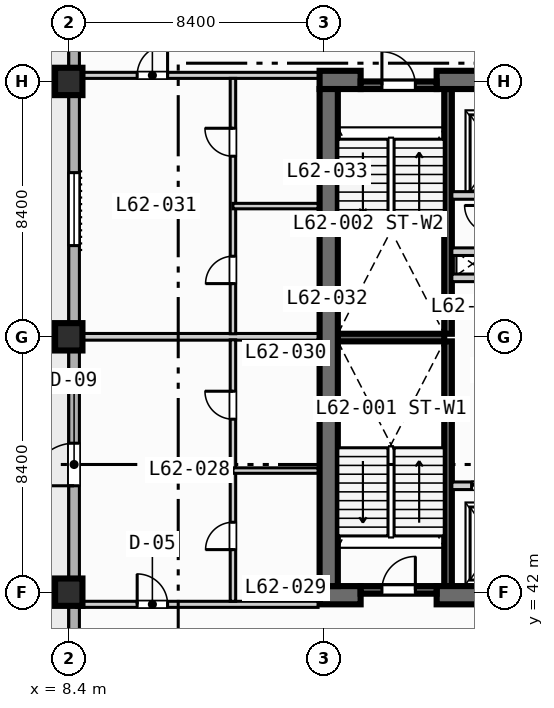
"""IFC4 building model, lengths in metres.
Left out: names, types, materials, properties, quantities, classifications, styles, units other than length and angle.
Written with IfcOpenShell. Run it as: python <this file> out.ifc"""

import sys

from ifc_helpers import new_model, si_unit, direction, frame, frame_2d, origin, origin_2d, place, context, subcontext, project, spatial, rectangle, extrude, element, fill, save


model = new_model("IFC4")
c1 = context("Model", 3, precision=1e-05, world=origin(), true_north=direction((0.0, 1.0)))
c2 = subcontext(c1, "Body", "Model", "MODEL_VIEW")
j1 = project(units=[si_unit("LENGTHUNIT", "METRE"), si_unit("PLANEANGLEUNIT", "RADIAN")], contexts=[c1])
p1 = place(None, origin())
s1 = spatial("IfcSite", under=j1, at=p1, CompositionType="ELEMENT")
p2 = place(p1, origin())
s2 = spatial("IfcBuilding", under=s1, at=p2, CompositionType="ELEMENT")
p3 = place(p2, frame((0.0, 0.0, 252.7)))
s3 = spatial("IfcBuildingStorey", under=s2, at=p3, CompositionType="ELEMENT", Elevation=252.7)
for number, where, z_axis, x_axis in (
    (1, (20.875, 42.2, 0.0), (0.0, 0.0, 1.0), (0.0, 1.0, 0.0)),
    (2, (20.875, 50.5, 0.0), (0.0, 0.0, 1.0), (0.0, 1.0, 0.0)),
):
    element("IfcWall", number, at=place(p3, frame(where, z_axis=z_axis, x_axis=x_axis)), inside=s3, PredefinedType="SOLIDWALL", context=c2, shape_type="SweptSolid", body=[
        extrude(rectangle(XDim=8.05, YDim=0.25, at=frame_2d((4.025, 0.0))), origin(), (0.0, 0.0, 1.0), 3.47),
    ])
p4 = place(p3, frame((17.25, 50.375, 0.0), z_axis=(0.0, 0.0, 1.0), x_axis=(1.0, 0.0, 0.0)))
e3 = element("IfcWall", 3, at=p4, inside=s3, PredefinedType="SOLIDWALL", context=c2, shape_type="SweptSolid", body=[
    extrude(rectangle(XDim=3.5, YDim=0.25, at=frame_2d((1.75, 0.0))), origin(), (0.0, 0.0, 1.0), 3.47),
])
p5 = place(p3, frame((16.65, 41.9, 0.0), z_axis=(0.0, 0.0, 1.0), x_axis=(1.0, 0.0, 0.0)))
e4 = element("IfcWall", 4, at=p5, inside=s3, PredefinedType="SHEAR", context=c2, shape_type="SweptSolid", body=[
    extrude(rectangle(XDim=1.35, YDim=0.6, at=frame_2d((0.675, 0.0))), origin(), (0.0, 0.0, 1.0), 3.47),
])
p6 = place(p3, frame((20.5, 41.9, 0.0), z_axis=(0.0, 0.0, 1.0), x_axis=(1.0, 0.0, 0.0)))
e5 = element("IfcWall", 5, at=p6, inside=s3, PredefinedType="SHEAR", context=c2, shape_type="SweptSolid", body=[
    extrude(rectangle(XDim=5.0, YDim=0.6, at=frame_2d((2.5, 0.0))), origin(), (0.0, 0.0, 1.0), 3.47),
])
p7 = place(p3, frame((16.65, 58.85, 0.0), z_axis=(0.0, 0.0, 1.0), x_axis=(1.0, 0.0, 0.0)))
e6 = element("IfcWall", 6, at=p7, inside=s3, PredefinedType="SHEAR", context=c2, shape_type="SweptSolid", body=[
    extrude(rectangle(XDim=1.35, YDim=0.6, at=frame_2d((0.675, 0.0))), origin(), (0.0, 0.0, 1.0), 3.47),
])
p8 = place(p3, frame((20.5, 58.85, 0.0), z_axis=(0.0, 0.0, 1.0), x_axis=(1.0, 0.0, 0.0)))
e7 = element("IfcWall", 7, at=p8, inside=s3, PredefinedType="SHEAR", context=c2, shape_type="SweptSolid", body=[
    extrude(rectangle(XDim=5.0, YDim=0.6, at=frame_2d((2.5, 0.0))), origin(), (0.0, 0.0, 1.0), 3.47),
])
p9 = place(p3, frame((16.95, 42.2, 0.0), z_axis=(0.0, 0.0, 1.0), x_axis=(0.0, 1.0, 0.0)))
e8 = element("IfcWall", 8, at=p9, inside=s3, PredefinedType="SHEAR", context=c2, shape_type="SweptSolid", body=[
    extrude(rectangle(XDim=16.35, YDim=0.6, at=frame_2d((8.175, 0.0))), origin(), (0.0, 0.0, 1.0), 3.47),
])
for number, where, z_axis, x_axis in (
    (9, (8.4, 42.0, 0.0), (0.0, 0.0, 1.0), (1.0, 0.0, 0.0)),
    (10, (8.4, 50.4, 0.0), (0.0, 0.0, 1.0), (1.0, 0.0, 0.0)),
    (11, (8.4, 58.8, 0.0), (0.0, 0.0, 1.0), (1.0, 0.0, 0.0)),
):
    element("IfcColumn", number, at=place(p3, frame(where, z_axis=z_axis, x_axis=x_axis)), inside=s3, PredefinedType="COLUMN", context=c2, shape_type="SweptSolid", body=[
        extrude(rectangle(XDim=0.9, YDim=0.9, at=origin_2d()), origin(), (0.0, 0.0, 1.0), 3.7),
    ])
p10 = place(p3, frame((8.575, 11.575, 0.0), z_axis=(0.0, 0.0, 1.0), x_axis=(0.0, 1.0, 0.0)))
e12 = element("IfcWall", 12, at=p10, inside=s3, PredefinedType="STANDARD", context=c2, shape_type="SweptSolid", body=[
    extrude(rectangle(XDim=60.85, YDim=0.35, at=frame_2d((30.425, 0.0))), origin(), (0.0, 0.0, 1.0), 3.47),
])
p11 = place(p10, frame((33.925, 0.0, 0.0)))
e13 = element("IfcOpeningElement", 13, at=p11, cuts=e12, PredefinedType="OPENING", context=c2, shape_type="SweptSolid", body=[
    extrude(rectangle(XDim=1.4, YDim=2.2, at=frame_2d((0.7, 1.1))), frame((0.0, 0.185, 0.0), z_axis=(0.0, -1.0, 0.0), x_axis=(1.0, 0.0, 0.0)), (0.0, 0.0, 1.0), 0.37),
])
p12 = place(p10, frame((25.025, 0.0, 0.85)))
e14 = element("IfcOpeningElement", 14, at=p12, cuts=e12, PredefinedType="OPENING", context=c2, shape_type="SweptSolid", body=[
    extrude(rectangle(XDim=2.4, YDim=1.95, at=frame_2d((1.2, 0.975))), frame((0.0, 0.185, 0.0), z_axis=(0.0, -1.0, 0.0), x_axis=(1.0, 0.0, 0.0)), (0.0, 0.0, 1.0), 0.37),
])
p13 = place(p10, frame((41.825, 0.0, 0.85)))
e15 = element("IfcOpeningElement", 15, at=p13, cuts=e12, PredefinedType="OPENING", context=c2, shape_type="SweptSolid", body=[
    extrude(rectangle(XDim=2.4, YDim=1.95, at=frame_2d((1.2, 0.975))), frame((0.0, 0.185, 0.0), z_axis=(0.0, -1.0, 0.0), x_axis=(1.0, 0.0, 0.0)), (0.0, 0.0, 1.0), 0.37),
])
p14 = place(p10, frame((19.25, 0.0, 0.85)))
e16 = element("IfcOpeningElement", 16, at=p14, cuts=e12, PredefinedType="OPENING", context=c2, shape_type="SweptSolid", body=[
    extrude(rectangle(XDim=1.8, YDim=1.8, at=frame_2d((0.9, 0.9))), frame((0.0, 0.185, 0.0), z_axis=(0.0, -1.0, 0.0), x_axis=(1.0, 0.0, 0.0)), (0.0, 0.0, 1.0), 0.37),
])
p15 = place(p3, frame((18.0, 42.075, 0.0), z_axis=(0.0, 0.0, 1.0), x_axis=(1.0, 0.0, 0.0)))
e17 = element("IfcWall", 17, at=p15, inside=s3, PredefinedType="SOLIDWALL", context=c2, shape_type="SweptSolid", body=[
    extrude(rectangle(XDim=2.5, YDim=0.25, at=frame_2d((1.25, 0.0))), origin(), (0.0, 0.0, 1.0), 3.47),
])
p16 = place(p15, frame((0.7, 0.0, 0.0)))
e18 = element("IfcOpeningElement", 18, at=p16, cuts=e17, PredefinedType="OPENING", context=c2, shape_type="SweptSolid", body=[
    extrude(rectangle(XDim=1.1, YDim=2.15, at=frame_2d((0.55, 1.075))), frame((0.0, 0.135, 0.0), z_axis=(0.0, -1.0, 0.0), x_axis=(1.0, 0.0, 0.0)), (0.0, 0.0, 1.0), 0.27),
])
p17 = place(p3, frame((18.0, 58.675, 0.0), z_axis=(0.0, 0.0, 1.0), x_axis=(1.0, 0.0, 0.0)))
e19 = element("IfcWall", 19, at=p17, inside=s3, PredefinedType="SOLIDWALL", context=c2, shape_type="SweptSolid", body=[
    extrude(rectangle(XDim=2.5, YDim=0.25, at=frame_2d((1.25, 0.0))), origin(), (0.0, 0.0, 1.0), 3.47),
])
p18 = place(p17, frame((0.7, 0.0, 0.0)))
e20 = element("IfcOpeningElement", 20, at=p18, cuts=e19, PredefinedType="OPENING", context=c2, shape_type="SweptSolid", body=[
    extrude(rectangle(XDim=1.1, YDim=2.15, at=frame_2d((0.55, 1.075))), frame((0.0, 0.135, 0.0), z_axis=(0.0, -1.0, 0.0), x_axis=(1.0, 0.0, 0.0)), (0.0, 0.0, 1.0), 0.27),
])
p19 = place(p3, frame((21.0, 45.5, 0.0), z_axis=(0.0, 0.0, 1.0), x_axis=(1.0, 0.0, 0.0)))
e21 = element("IfcWall", 21, at=p19, inside=s3, PredefinedType="SOLIDWALL", context=c2, shape_type="SweptSolid", body=[
    extrude(rectangle(XDim=4.15, YDim=0.25, at=frame_2d((2.075, 0.0))), origin(), (0.0, 0.0, 1.0), 3.47),
])
p20 = place(p19, frame((0.65, 0.0, 0.0)))
e22 = element("IfcOpeningElement", 22, at=p20, cuts=e21, PredefinedType="OPENING", context=c2, shape_type="SweptSolid", body=[
    extrude(rectangle(XDim=1.1, YDim=2.15, at=frame_2d((0.55, 1.075))), frame((0.0, 0.135, 0.0), z_axis=(0.0, -1.0, 0.0), x_axis=(1.0, 0.0, 0.0)), (0.0, 0.0, 1.0), 0.27),
])
p21 = place(p3, frame((21.0, 52.34, 0.0), z_axis=(0.0, 0.0, 1.0), x_axis=(1.0, 0.0, 0.0)))
e23 = element("IfcWall", 23, at=p21, inside=s3, PredefinedType="SOLIDWALL", context=c2, shape_type="SweptSolid", body=[
    extrude(rectangle(XDim=3.9, YDim=0.25, at=frame_2d((1.95, 0.0))), origin(), (0.0, 0.0, 1.0), 3.47),
])
p22 = place(p3, frame((21.0, 55.05, 0.0), z_axis=(0.0, 0.0, 1.0), x_axis=(1.0, 0.0, 0.0)))
e24 = element("IfcWall", 24, at=p22, inside=s3, PredefinedType="SOLIDWALL", context=c2, shape_type="SweptSolid", body=[
    extrude(rectangle(XDim=4.15, YDim=0.25, at=frame_2d((2.075, 0.0))), origin(), (0.0, 0.0, 1.0), 3.47),
])
p23 = place(p22, frame((1.85, 0.0, 0.0)))
e25 = element("IfcOpeningElement", 25, at=p23, cuts=e24, PredefinedType="OPENING", context=c2, shape_type="SweptSolid", body=[
    extrude(rectangle(XDim=1.1, YDim=2.15, at=frame_2d((0.55, 1.075))), frame((0.0, 0.135, 0.0), z_axis=(0.0, -1.0, 0.0), x_axis=(1.0, 0.0, 0.0)), (0.0, 0.0, 1.0), 0.27),
])
p24 = place(p3, frame((21.0, 53.2, 0.0), z_axis=(0.0, 0.0, 1.0), x_axis=(1.0, 0.0, 0.0)))
e26 = element("IfcWall", 26, at=p24, inside=s3, PredefinedType="SOLIDWALL", context=c2, shape_type="SweptSolid", body=[
    extrude(rectangle(XDim=1.3, YDim=0.25, at=frame_2d((0.65, 0.0))), origin(), (0.0, 0.0, 1.0), 3.47),
])
p25 = place(p3, frame((8.65, 41.6, 0.0), z_axis=(0.0, 0.0, 1.0), x_axis=(1.0, 0.0, 0.0)))
e27 = element("IfcWall", 27, at=p25, inside=s3, PredefinedType="PARTITIONING", context=c2, shape_type="SweptSolid", body=[
    extrude(rectangle(XDim=7.95, YDim=0.2, at=frame_2d((3.975, 0.0))), origin(), (0.0, 0.0, 1.0), 3.47),
])
p26 = place(p25, frame((2.0, 0.0, 0.0)))
e28 = element("IfcOpeningElement", 28, at=p26, cuts=e27, PredefinedType="OPENING", context=c2, shape_type="SweptSolid", body=[
    extrude(rectangle(XDim=1.0, YDim=2.15, at=frame_2d((0.5, 1.075))), frame((0.0, 0.11, 0.0), z_axis=(0.0, -1.0, 0.0), x_axis=(1.0, 0.0, 0.0)), (0.0, 0.0, 1.0), 0.22),
])
p27 = place(p3, frame((8.65, 59.0, 0.0), z_axis=(0.0, 0.0, 1.0), x_axis=(1.0, 0.0, 0.0)))
e29 = element("IfcWall", 29, at=p27, inside=s3, PredefinedType="PARTITIONING", context=c2, shape_type="SweptSolid", body=[
    extrude(rectangle(XDim=7.95, YDim=0.2, at=frame_2d((3.975, 0.0))), origin(), (0.0, 0.0, 1.0), 2.82),
])
p28 = place(p27, frame((2.0, 0.0, 0.0)))
e30 = element("IfcOpeningElement", 30, at=p28, cuts=e29, PredefinedType="OPENING", context=c2, shape_type="SweptSolid", body=[
    extrude(rectangle(XDim=1.0, YDim=2.15, at=frame_2d((0.5, 1.075))), frame((0.0, 0.11, 0.0), z_axis=(0.0, -1.0, 0.0), x_axis=(1.0, 0.0, 0.0)), (0.0, 0.0, 1.0), 0.22),
])
p29 = place(p3, frame((8.65, 50.4, 0.0), z_axis=(0.0, 0.0, 1.0), x_axis=(1.0, 0.0, 0.0)))
e31 = element("IfcWall", 31, at=p29, inside=s3, PredefinedType="PARTITIONING", context=c2, shape_type="SweptSolid", body=[
    extrude(rectangle(XDim=7.95, YDim=0.22, at=frame_2d((3.975, 0.0))), origin(), (0.0, 0.0, 1.0), 2.859),
])
p30 = place(p3, frame((13.8, 41.7, 0.0), z_axis=(0.0, 0.0, 1.0), x_axis=(0.0, 1.0, 0.0)))
e32 = element("IfcWall", 32, at=p30, inside=s3, PredefinedType="PLUMBINGWALL", context=c2, shape_type="SweptSolid", body=[
    extrude(rectangle(XDim=8.6, YDim=0.18, at=frame_2d((4.3, 0.0))), origin(), (0.0, 0.0, 1.0), 3.47),
])
p31 = place(p30, frame((1.7, 0.0, 0.0)))
e33 = element("IfcOpeningElement", 33, at=p31, cuts=e32, PredefinedType="OPENING", context=c2, shape_type="SweptSolid", body=[
    extrude(rectangle(XDim=0.9, YDim=2.1, at=frame_2d((0.45, 1.05))), frame((0.0, 0.1, 0.0), z_axis=(0.0, -1.0, 0.0), x_axis=(1.0, 0.0, 0.0)), (0.0, 0.0, 1.0), 0.2),
])
p32 = place(p30, frame((5.99, 0.0, 0.0)))
e34 = element("IfcOpeningElement", 34, at=p32, cuts=e32, PredefinedType="OPENING", context=c2, shape_type="SweptSolid", body=[
    extrude(rectangle(XDim=0.92, YDim=2.1, at=frame_2d((0.46, 1.05))), frame((0.0, 0.1, 0.0), z_axis=(0.0, -1.0, 0.0), x_axis=(1.0, 0.0, 0.0)), (0.0, 0.0, 1.0), 0.2),
])
p33 = place(p3, frame((13.8, 46.0, 0.0), z_axis=(0.0, 0.0, 1.0), x_axis=(1.0, 0.0, 0.0)))
e35 = element("IfcWall", 35, at=p33, inside=s3, PredefinedType="PLUMBINGWALL", context=c2, shape_type="SweptSolid", body=[
    extrude(rectangle(XDim=2.8, YDim=0.18, at=frame_2d((1.4, 0.0))), origin(), (0.0, 0.0, 1.0), 3.47),
])
p34 = place(p3, frame((13.8, 50.5, 0.0), z_axis=(0.0, 0.0, 1.0), x_axis=(0.0, 1.0, 0.0)))
e36 = element("IfcWall", 36, at=p34, inside=s3, PredefinedType="PLUMBINGWALL", context=c2, shape_type="SweptSolid", body=[
    extrude(rectangle(XDim=8.4, YDim=0.18, at=frame_2d((4.2, 0.0))), origin(), (0.0, 0.0, 1.0), 3.47),
])
p35 = place(p34, frame((1.65, 0.0, 0.0)))
e37 = element("IfcOpeningElement", 37, at=p35, cuts=e36, PredefinedType="OPENING", context=c2, shape_type="SweptSolid", body=[
    extrude(rectangle(XDim=0.9, YDim=2.1, at=frame_2d((0.45, 1.05))), frame((0.0, 0.1, 0.0), z_axis=(0.0, -1.0, 0.0), x_axis=(1.0, 0.0, 0.0)), (0.0, 0.0, 1.0), 0.2),
])
p36 = place(p34, frame((5.84, 0.0, 0.0)))
e38 = element("IfcOpeningElement", 38, at=p36, cuts=e36, PredefinedType="OPENING", context=c2, shape_type="SweptSolid", body=[
    extrude(rectangle(XDim=0.92, YDim=2.1, at=frame_2d((0.46, 1.05))), frame((0.0, 0.1, 0.0), z_axis=(0.0, -1.0, 0.0), x_axis=(1.0, 0.0, 0.0)), (0.0, 0.0, 1.0), 0.2),
])
p37 = place(p3, frame((13.8, 54.7, 0.0), z_axis=(0.0, 0.0, 1.0), x_axis=(1.0, 0.0, 0.0)))
e39 = element("IfcWall", 39, at=p37, inside=s3, PredefinedType="PLUMBINGWALL", context=c2, shape_type="SweptSolid", body=[
    extrude(rectangle(XDim=2.8, YDim=0.18, at=frame_2d((1.4, 0.0))), origin(), (0.0, 0.0, 1.0), 3.47),
])
p38 = place(p11, origin())
e40 = element("IfcDoor", 40, at=p38, inside=s3, OperationType="SINGLE_SWING_LEFT", PredefinedType="DOOR", context=c2, shape_type="SweptSolid", body=[
    extrude(rectangle(XDim=1.4, YDim=2.2, at=frame_2d((0.7, 1.1))), frame((0.0, 0.025, 0.0), z_axis=(0.0, -1.0, 0.0), x_axis=(1.0, 0.0, 0.0)), (0.0, 0.0, 1.0), 0.05),
])
fill(e13, e40)
p39 = place(p13, origin())
e41 = element("IfcWindow", 41, at=p39, inside=s3, PartitioningType="SINGLE_PANEL", PredefinedType="WINDOW", context=c2, shape_type="SweptSolid", body=[
    extrude(rectangle(XDim=2.4, YDim=1.95, at=frame_2d((1.2, 0.975))), frame((0.0, 0.03, 0.0), z_axis=(0.0, -1.0, 0.0), x_axis=(1.0, 0.0, 0.0)), (0.0, 0.0, 1.0), 0.06),
])
fill(e15, e41)
p40 = place(p16, origin())
e42 = element("IfcDoor", 42, at=p40, inside=s3, OperationType="SINGLE_SWING_RIGHT", PredefinedType="DOOR", context=c2, shape_type="SweptSolid", body=[
    extrude(rectangle(XDim=1.1, YDim=2.15, at=frame_2d((0.55, 1.075))), frame((0.0, 0.025, 0.0), z_axis=(0.0, -1.0, 0.0), x_axis=(1.0, 0.0, 0.0)), (0.0, 0.0, 1.0), 0.05),
])
fill(e18, e42)
p41 = place(p18, origin())
e43 = element("IfcDoor", 43, at=p41, inside=s3, OperationType="SINGLE_SWING_LEFT", PredefinedType="DOOR", context=c2, shape_type="SweptSolid", body=[
    extrude(rectangle(XDim=1.1, YDim=2.15, at=frame_2d((0.55, 1.075))), frame((0.0, 0.025, 0.0), z_axis=(0.0, -1.0, 0.0), x_axis=(1.0, 0.0, 0.0)), (0.0, 0.0, 1.0), 0.05),
])
fill(e20, e43)
p42 = place(p20, origin())
e44 = element("IfcDoor", 44, at=p42, inside=s3, OperationType="SLIDING_TO_LEFT", PredefinedType="DOOR", context=c2, shape_type="SweptSolid", body=[
    extrude(rectangle(XDim=1.1, YDim=2.15, at=frame_2d((0.55, 1.075))), frame((0.0, 0.025, 0.0), z_axis=(0.0, -1.0, 0.0), x_axis=(1.0, 0.0, 0.0)), (0.0, 0.0, 1.0), 0.05),
])
fill(e22, e44)
p43 = place(p26, origin())
e45 = element("IfcDoor", 45, at=p43, inside=s3, OperationType="SINGLE_SWING_LEFT", PredefinedType="DOOR", context=c2, shape_type="SweptSolid", body=[
    extrude(rectangle(XDim=1.0, YDim=2.15, at=frame_2d((0.5, 1.075))), frame((0.0, 0.025, 0.0), z_axis=(0.0, -1.0, 0.0), x_axis=(1.0, 0.0, 0.0)), (0.0, 0.0, 1.0), 0.05),
])
fill(e28, e45)
p44 = place(p28, origin())
e46 = element("IfcDoor", 46, at=p44, inside=s3, OperationType="SINGLE_SWING_RIGHT", PredefinedType="DOOR", context=c2, shape_type="SweptSolid", body=[
    extrude(rectangle(XDim=1.0, YDim=2.15, at=frame_2d((0.5, 1.075))), frame((0.0, 0.025, 0.0), z_axis=(0.0, -1.0, 0.0), x_axis=(1.0, 0.0, 0.0)), (0.0, 0.0, 1.0), 0.05),
])
fill(e30, e46)
p45 = place(p31, origin())
e47 = element("IfcDoor", 47, at=p45, inside=s3, OperationType="SINGLE_SWING_LEFT", PredefinedType="DOOR", context=c2, shape_type="SweptSolid", body=[
    extrude(rectangle(XDim=0.9, YDim=2.1, at=frame_2d((0.45, 1.05))), frame((0.0, 0.025, 0.0), z_axis=(0.0, -1.0, 0.0), x_axis=(1.0, 0.0, 0.0)), (0.0, 0.0, 1.0), 0.05),
])
fill(e33, e47)
p46 = place(p32, origin())
e48 = element("IfcDoor", 48, at=p46, inside=s3, OperationType="SINGLE_SWING_RIGHT", PredefinedType="DOOR", context=c2, shape_type="SweptSolid", body=[
    extrude(rectangle(XDim=0.92, YDim=2.1, at=frame_2d((0.46, 1.05))), frame((0.0, 0.025, 0.0), z_axis=(0.0, -1.0, 0.0), x_axis=(1.0, 0.0, 0.0)), (0.0, 0.0, 1.0), 0.05),
])
fill(e34, e48)
p47 = place(p35, origin())
e49 = element("IfcDoor", 49, at=p47, inside=s3, OperationType="SINGLE_SWING_LEFT", PredefinedType="DOOR", context=c2, shape_type="SweptSolid", body=[
    extrude(rectangle(XDim=0.9, YDim=2.1, at=frame_2d((0.45, 1.05))), frame((0.0, 0.025, 0.0), z_axis=(0.0, -1.0, 0.0), x_axis=(1.0, 0.0, 0.0)), (0.0, 0.0, 1.0), 0.05),
])
fill(e37, e49)
p48 = place(p36, origin())
e50 = element("IfcDoor", 50, at=p48, inside=s3, OperationType="SINGLE_SWING_RIGHT", PredefinedType="DOOR", context=c2, shape_type="SweptSolid", body=[
    extrude(rectangle(XDim=0.92, YDim=2.1, at=frame_2d((0.46, 1.05))), frame((0.0, 0.025, 0.0), z_axis=(0.0, -1.0, 0.0), x_axis=(1.0, 0.0, 0.0)), (0.0, 0.0, 1.0), 0.05),
])
fill(e38, e50)
save(model, sys.argv[1])
